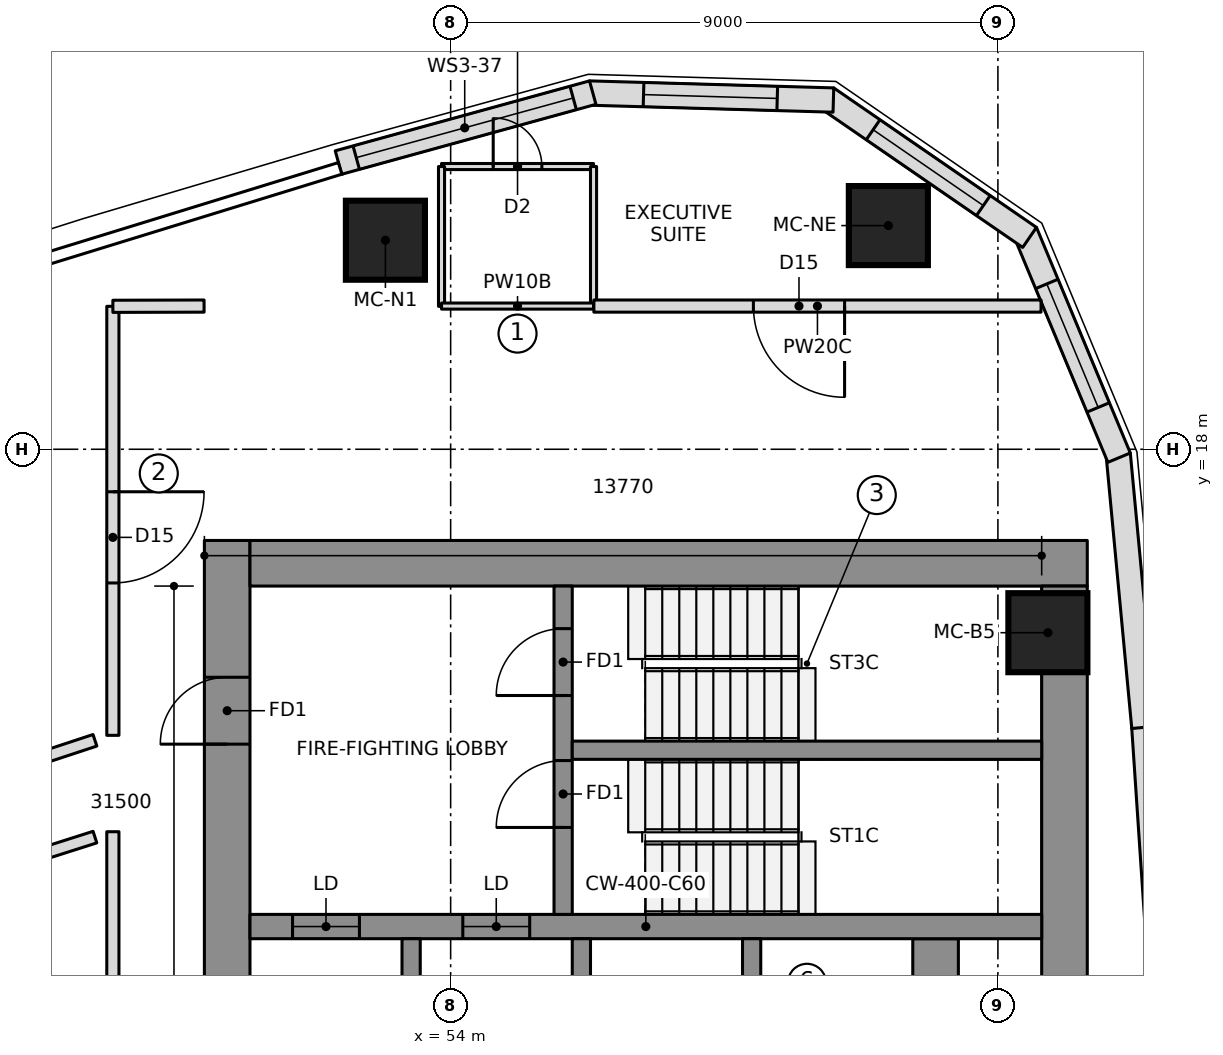
"""IFC4 building model, lengths in metres.
Left out: names, types, materials, properties, quantities, classifications, styles, units other than length and angle.
Written with IfcOpenShell. Run it as: python <this file> out.ifc"""

import sys

from ifc_helpers import new_model, si_unit, direction, frame, frame_2d, origin, origin_2d, place, context, subcontext, project, spatial, polyline, rectangle, outline, extrude, element, fill, save


model = new_model("IFC4")
c1 = context("Model", 3, precision=1e-05, world=origin(), true_north=direction((0.0, 1.0)))
c2 = subcontext(c1, "Body", "Model", "MODEL_VIEW")
j1 = project(units=[si_unit("LENGTHUNIT", "METRE"), si_unit("PLANEANGLEUNIT", "RADIAN")], contexts=[c1])
p1 = place(None, origin())
s1 = spatial("IfcSite", under=j1, at=p1, CompositionType="ELEMENT")
p2 = place(p1, origin())
s2 = spatial("IfcBuilding", under=s1, at=p2, CompositionType="ELEMENT")
p3 = place(p2, frame((0.0, 0.0, 189.7)))
s3 = spatial("IfcBuildingStorey", under=s2, at=p3, CompositionType="ELEMENT", Elevation=189.7)
p4 = place(p3, frame((50.325, 6.65, 0.0), z_axis=(0.0, 0.0, 1.0), x_axis=(0.0, 1.0, 0.0)))
e1 = element("IfcWall", 1, at=p4, inside=s3, PredefinedType="SHEAR", context=c2, shape_type="SweptSolid", body=[
    extrude(rectangle(XDim=9.85, YDim=0.75, at=frame_2d((4.925, 0.0))), origin(), (0.0, 0.0, 1.0), 3.55),
])
p5 = place(p4, frame((6.5, 0.0, 0.0)))
e2 = element("IfcOpeningElement", 2, at=p5, cuts=e1, PredefinedType="OPENING", context=c2, shape_type="SweptSolid", body=[
    extrude(rectangle(XDim=1.1, YDim=2.1, at=frame_2d((0.55, 1.05))), frame((0.0, 0.385, 0.0), z_axis=(0.0, -1.0, 0.0), x_axis=(1.0, 0.0, 0.0)), (0.0, 0.0, 1.0), 0.77),
])
p6 = place(p3, frame((50.7, 16.125, 0.0), z_axis=(0.0, 0.0, 1.0), x_axis=(1.0, 0.0, 0.0)))
e3 = element("IfcWall", 3, at=p6, inside=s3, PredefinedType="SHEAR", context=c2, shape_type="SweptSolid", body=[
    extrude(rectangle(XDim=13.77, YDim=0.75, at=frame_2d((6.885, 0.0))), origin(), (0.0, 0.0, 1.0), 3.55),
])
p7 = place(p3, frame((64.095, 8.099, 0.0), z_axis=(0.0, 0.0, 1.0), x_axis=(0.0, 1.0, 0.0)))
e4 = element("IfcWall", 4, at=p7, inside=s3, PredefinedType="SHEAR", context=c2, shape_type="SweptSolid", body=[
    extrude(rectangle(XDim=7.651, YDim=0.75, at=frame_2d((3.825, 0.0))), origin(), (0.0, 0.0, 1.0), 3.55),
])
p8 = place(p3, frame((61.975, -9.95, 0.0), z_axis=(0.0, 0.0, 1.0), x_axis=(0.0, 1.0, 0.0)))
e5 = element("IfcWall", 5, at=p8, inside=s3, PredefinedType="SHEAR", context=c2, shape_type="SweptSolid", body=[
    extrude(rectangle(XDim=19.9, YDim=0.75, at=frame_2d((9.95, 0.0))), origin(), (0.0, 0.0, 1.0), 3.55),
])
p9 = place(p3, frame((50.7, 10.15, 0.0), z_axis=(0.0, 0.0, 1.0), x_axis=(1.0, 0.0, 0.0)))
e6 = element("IfcWall", 6, at=p9, inside=s3, PredefinedType="SHEAR", context=c2, shape_type="SweptSolid", body=[
    extrude(rectangle(XDim=13.02, YDim=0.4, at=frame_2d((6.51, 0.0))), origin(), (0.0, 0.0, 1.0), 3.55),
])
p10 = place(p9, frame((0.7, 0.0, 0.0)))
e7 = element("IfcOpeningElement", 7, at=p10, cuts=e6, PredefinedType="OPENING", context=c2, shape_type="SweptSolid", body=[
    extrude(rectangle(XDim=1.1, YDim=2.1, at=frame_2d((0.55, 1.05))), frame((0.0, 0.21, 0.0), z_axis=(0.0, -1.0, 0.0), x_axis=(1.0, 0.0, 0.0)), (0.0, 0.0, 1.0), 0.42),
])
p11 = place(p9, frame((3.5, 0.0, 0.0)))
e8 = element("IfcOpeningElement", 8, at=p11, cuts=e6, PredefinedType="OPENING", context=c2, shape_type="SweptSolid", body=[
    extrude(rectangle(XDim=1.1, YDim=2.1, at=frame_2d((0.55, 1.05))), frame((0.0, 0.21, 0.0), z_axis=(0.0, -1.0, 0.0), x_axis=(1.0, 0.0, 0.0)), (0.0, 0.0, 1.0), 0.42),
])
for number, where, z_axis, x_axis in (
    (9, (53.35, 6.95, 0.0), (0.0, 0.0, 1.0), (0.0, 1.0, 0.0)),
    (10, (56.15, 6.95, 0.0), (0.0, 0.0, 1.0), (0.0, 1.0, 0.0)),
    (11, (58.95, 6.95, 0.0), (0.0, 0.0, 1.0), (0.0, 1.0, 0.0)),
):
    element("IfcWall", number, at=place(p3, frame(where, z_axis=z_axis, x_axis=x_axis)), inside=s3, PredefinedType="SHEAR", context=c2, shape_type="SweptSolid", body=[
        extrude(rectangle(XDim=3.0, YDim=0.3, at=frame_2d((1.5, 0.0))), origin(), (0.0, 0.0, 1.0), 3.55),
    ])
p12 = place(p3, frame((55.85, 10.35, 0.0), z_axis=(0.0, 0.0, 1.0), x_axis=(0.0, 1.0, 0.0)))
e12 = element("IfcWall", 12, at=p12, inside=s3, PredefinedType="SHEAR", context=c2, shape_type="SweptSolid", body=[
    extrude(rectangle(XDim=5.4, YDim=0.3, at=frame_2d((2.7, 0.0))), origin(), (0.0, 0.0, 1.0), 3.55),
])
p13 = place(p12, frame((1.43, 0.0, 0.0)))
e13 = element("IfcOpeningElement", 13, at=p13, cuts=e12, PredefinedType="OPENING", context=c2, shape_type="SweptSolid", body=[
    extrude(rectangle(XDim=1.1, YDim=2.1, at=frame_2d((0.55, 1.05))), frame((0.0, 0.16, 0.0), z_axis=(0.0, -1.0, 0.0), x_axis=(1.0, 0.0, 0.0)), (0.0, 0.0, 1.0), 0.32),
])
p14 = place(p12, frame((3.6, 0.0, 0.0)))
e14 = element("IfcOpeningElement", 14, at=p14, cuts=e12, PredefinedType="OPENING", context=c2, shape_type="SweptSolid", body=[
    extrude(rectangle(XDim=1.1, YDim=2.1, at=frame_2d((0.55, 1.05))), frame((0.0, 0.16, 0.0), z_axis=(0.0, -1.0, 0.0), x_axis=(1.0, 0.0, 0.0)), (0.0, 0.0, 1.0), 0.32),
])
p15 = place(p3, frame((56.0, 13.05, 0.0), z_axis=(0.0, 0.0, 1.0), x_axis=(1.0, 0.0, 0.0)))
e15 = element("IfcWall", 15, at=p15, inside=s3, PredefinedType="SHEAR", context=c2, shape_type="SweptSolid", body=[
    extrude(rectangle(XDim=7.72, YDim=0.3, at=frame_2d((3.86, 0.0))), origin(), (0.0, 0.0, 1.0), 3.55),
])
for number, where, z_axis, x_axis in (
    (16, (63.822, 14.983, 0.0), (0.0, 0.0, 1.0), (1.0, 0.0, 0.0)),
    (17, (61.198, 21.679, 0.0), (0.0, 0.0, 1.0), (1.0, 0.0, 0.0)),
    (18, (52.927, 21.438, 0.0), (0.0, 0.0, 1.0), (1.0, 0.0, 0.0)),
):
    element("IfcColumn", number, at=place(p3, frame(where, z_axis=z_axis, x_axis=x_axis)), inside=s3, PredefinedType="COLUMN", context=c2, shape_type="SweptSolid", body=[
        extrude(rectangle(XDim=1.3, YDim=1.3, at=origin_2d()), origin(), (0.0, 0.0, 1.0), 3.55),
    ])
p16 = place(p3, frame((65.7, 8.958, 0.0), z_axis=(0.0, 0.0, 1.0), x_axis=(-0.066905935948, 0.997759287471, 0.0)))
e19 = element("IfcWall", 19, at=p16, inside=s3, PredefinedType="NOTDEFINED", context=c2, shape_type="SweptSolid", body=[
    extrude(outline(polyline([(-0.003, -0.2), (4.484, -0.2), (4.478, 0.2), (0.003, 0.2), (-0.003, -0.2)])), origin(), (0.0, 0.0, 1.0), 3.25),
])
p17 = place(p3, frame((65.401, 13.429, 0.0), z_axis=(0.0, 0.0, 1.0), x_axis=(-0.093605694738, 0.995609348044, 0.0)))
e20 = element("IfcWall", 20, at=p17, inside=s3, PredefinedType="NOTDEFINED", context=c2, shape_type="SweptSolid", body=[
    extrude(outline(polyline([(-0.003, -0.2), (4.511, -0.2), (4.451, 0.2), (0.003, 0.2), (-0.003, -0.2)])), origin(), (0.0, 0.0, 1.0), 3.25),
])
p18 = place(p3, frame((64.981, 17.89, 0.0), z_axis=(0.0, 0.0, 1.0), x_axis=(-0.383997619794, 0.923334082547, 0.0)))
e21 = element("IfcWall", 21, at=p18, inside=s3, PredefinedType="NOTDEFINED", context=c2, shape_type="SweptSolid", body=[
    extrude(outline(polyline([(-0.03, -0.2), (3.988, -0.2), (3.87, 0.2), (0.03, 0.2), (-0.03, -0.2)])), origin(), (0.0, 0.0, 1.0), 3.25),
])
p19 = place(p18, frame((0.865, 0.0, 0.6)))
e22 = element("IfcOpeningElement", 22, at=p19, cuts=e21, PredefinedType="OPENING", context=c2, shape_type="SweptSolid", body=[
    extrude(outline(polyline([(0.0, 1.35), (0.084, 1.771), (0.322, 2.128), (0.679, 2.366), (1.1, 2.45), (1.521, 2.366), (1.878, 2.128), (2.116, 1.771), (2.2, 1.35), (2.2, 1.1), (2.116, 0.679), (1.878, 0.322), (1.521, 0.084), (1.1, 0.0), (0.679, 0.084), (0.322, 0.322), (0.084, 0.679), (0.0, 1.1), (0.0, 1.35)])), frame((0.0, 0.21, 0.0), z_axis=(0.0, -1.0, 0.0), x_axis=(1.0, 0.0, 0.0)), (0.0, 0.0, 1.0), 0.42),
])
p20 = place(p3, frame((63.472, 21.518, 0.0), z_axis=(0.0, 0.0, 1.0), x_axis=(-0.823806162588, 0.566871596115, 0.0)))
e23 = element("IfcWall", 23, at=p20, inside=s3, PredefinedType="NOTDEFINED", context=c2, shape_type="SweptSolid", body=[
    extrude(outline(polyline([(-0.059, -0.2), (3.988, -0.2), (3.87, 0.2), (0.059, 0.2), (-0.059, -0.2)])), origin(), (0.0, 0.0, 1.0), 3.25),
])
p21 = place(p20, frame((0.865, 0.0, 0.6)))
e24 = element("IfcOpeningElement", 24, at=p21, cuts=e23, PredefinedType="OPENING", context=c2, shape_type="SweptSolid", body=[
    extrude(outline(polyline([(0.0, 1.35), (0.084, 1.771), (0.322, 2.128), (0.679, 2.366), (1.1, 2.45), (1.521, 2.366), (1.878, 2.128), (2.116, 1.771), (2.2, 1.35), (2.2, 1.1), (2.116, 0.679), (1.878, 0.322), (1.521, 0.084), (1.1, 0.0), (0.679, 0.084), (0.322, 0.322), (0.084, 0.679), (0.0, 1.1), (0.0, 1.35)])), frame((0.0, 0.21, 0.0), z_axis=(0.0, -1.0, 0.0), x_axis=(1.0, 0.0, 0.0)), (0.0, 0.0, 1.0), 0.42),
])
p22 = place(p3, frame((60.236, 23.745, 0.0), z_axis=(0.0, 0.0, 1.0), x_axis=(-0.999587920197, 0.028705222472, 0.0)))
e25 = element("IfcWall", 25, at=p22, inside=s3, PredefinedType="NOTDEFINED", context=c2, shape_type="SweptSolid", body=[
    extrude(outline(polyline([(-0.059, -0.2), (3.959, -0.2), (3.9, 0.2), (0.059, 0.2), (-0.059, -0.2)])), origin(), (0.0, 0.0, 1.0), 3.25),
])
p23 = place(p22, frame((0.865, 0.0, 0.6)))
e26 = element("IfcOpeningElement", 26, at=p23, cuts=e25, PredefinedType="OPENING", context=c2, shape_type="SweptSolid", body=[
    extrude(outline(polyline([(0.0, 1.35), (0.084, 1.771), (0.322, 2.128), (0.679, 2.366), (1.1, 2.45), (1.521, 2.366), (1.878, 2.128), (2.116, 1.771), (2.2, 1.35), (2.2, 1.1), (2.116, 0.679), (1.878, 0.322), (1.521, 0.084), (1.1, 0.0), (0.679, 0.084), (0.322, 0.322), (0.084, 0.679), (0.0, 1.1), (0.0, 1.35)])), frame((0.0, 0.21, 0.0), z_axis=(0.0, -1.0, 0.0), x_axis=(1.0, 0.0, 0.0)), (0.0, 0.0, 1.0), 0.42),
])
p24 = place(p3, frame((56.308, 23.858, 0.0), z_axis=(0.0, 0.0, 1.0), x_axis=(-0.964205755089, -0.265155165617, 0.0)))
e27 = element("IfcWall", 27, at=p24, inside=s3, PredefinedType="NOTDEFINED", context=c2, shape_type="SweptSolid", body=[
    extrude(outline(polyline([(-0.03, -0.2), (4.307, -0.2), (4.307, 0.2), (0.03, 0.2), (-0.03, -0.2)])), origin(), (0.0, 0.0, 1.0), 3.25),
])
p25 = place(p24, frame((0.303, 0.0, 0.9)))
e28 = element("IfcOpeningElement", 28, at=p25, cuts=e27, PredefinedType="OPENING", context=c2, shape_type="SweptSolid", body=[
    extrude(rectangle(XDim=3.7, YDim=1.8, at=frame_2d((1.85, 0.9))), frame((0.0, 0.21, 0.0), z_axis=(0.0, -1.0, 0.0), x_axis=(1.0, 0.0, 0.0)), (0.0, 0.0, 1.0), 0.42),
])
p26 = place(p3, frame((53.85, 22.65, 0.0), z_axis=(0.0, 0.0, 1.0), x_axis=(1.0, 0.0, 0.0)))
e29 = element("IfcWall", 29, at=p26, inside=s3, PredefinedType="PARTITIONING", context=c2, shape_type="SweptSolid", body=[
    extrude(rectangle(XDim=2.5, YDim=0.1, at=frame_2d((1.25, 0.0))), origin(), (0.0, 0.0, 1.0), 3.25),
])
p27 = place(p26, frame((0.85, 0.0, 0.0)))
e30 = element("IfcOpeningElement", 30, at=p27, cuts=e29, PredefinedType="OPENING", context=c2, shape_type="SweptSolid", body=[
    extrude(rectangle(XDim=0.8, YDim=2.1, at=frame_2d((0.4, 1.05))), frame((0.0, 0.06, 0.0), z_axis=(0.0, -1.0, 0.0), x_axis=(1.0, 0.0, 0.0)), (0.0, 0.0, 1.0), 0.12),
])
for number, where, z_axis, x_axis in (
    (31, (56.35, 22.65, 0.0), (0.0, 0.0, 1.0), (0.0, -1.0, 0.0)),
    (32, (53.85, 20.35, 0.0), (0.0, 0.0, 1.0), (0.0, 1.0, 0.0)),
):
    element("IfcWall", number, at=place(p3, frame(where, z_axis=z_axis, x_axis=x_axis)), inside=s3, PredefinedType="PARTITIONING", context=c2, shape_type="SweptSolid", body=[
        extrude(rectangle(XDim=2.3, YDim=0.1, at=frame_2d((1.15, 0.0))), origin(), (0.0, 0.0, 1.0), 3.25),
    ])
p28 = place(p3, frame((63.709, 20.355, 0.0), z_axis=(0.0, 0.0, 1.0), x_axis=(-1.0, 0.0, 0.0)))
e33 = element("IfcWall", 33, at=p28, inside=s3, PredefinedType="PARTITIONING", context=c2, shape_type="SweptSolid", body=[
    extrude(rectangle(XDim=7.354, YDim=0.2, at=frame_2d((3.677, 0.0))), origin(), (0.0, 0.0, 1.0), 3.25),
])
p29 = place(p28, frame((3.231, 0.0, 0.0)))
e34 = element("IfcOpeningElement", 34, at=p29, cuts=e33, PredefinedType="OPENING", context=c2, shape_type="SweptSolid", body=[
    extrude(rectangle(XDim=1.5, YDim=2.1, at=frame_2d((0.75, 1.05))), frame((0.0, 0.11, 0.0), z_axis=(0.0, -1.0, 0.0), x_axis=(1.0, 0.0, 0.0)), (0.0, 0.0, 1.0), 0.22),
])
p30 = place(p3, frame((56.35, 20.355, 0.0), z_axis=(0.0, 0.0, 1.0), x_axis=(-1.0, 0.0, 0.0)))
e35 = element("IfcWall", 35, at=p30, inside=s3, PredefinedType="PARTITIONING", context=c2, shape_type="SweptSolid", body=[
    extrude(rectangle(XDim=2.5, YDim=0.1, at=frame_2d((1.25, 0.0))), origin(), (0.0, 0.0, 1.0), 3.25),
])
p31 = place(p3, frame((48.15, 13.213, 0.0), z_axis=(0.0, 0.0, 1.0), x_axis=(-0.949729856115, -0.313070599711, 0.0)))
e36 = element("IfcWall", 36, at=p31, inside=s3, PredefinedType="PARTITIONING", context=c2, shape_type="SweptSolid", body=[
    extrude(rectangle(XDim=3.853, YDim=0.2, at=frame_2d((1.927, 0.0))), origin(), (0.0, 0.0, 1.0), 3.25),
])
p32 = place(p3, frame((46.881, 11.217, 0.0), z_axis=(0.0, 0.0, 1.0), x_axis=(0.952761948983, 0.303718074157, 0.0)))
e37 = element("IfcWall", 37, at=p32, inside=s3, PredefinedType="PARTITIONING", context=c2, shape_type="SweptSolid", body=[
    extrude(rectangle(XDim=1.332, YDim=0.2, at=frame_2d((0.666, 0.0))), origin(), (0.0, 0.0, 1.0), 3.25),
])
p33 = place(p3, frame((48.445, 11.71, 0.0), z_axis=(0.0, 0.0, 1.0), x_axis=(0.0, -1.0, 0.0)))
e38 = element("IfcWall", 38, at=p33, inside=s3, PredefinedType="PARTITIONING", context=c2, shape_type="SweptSolid", body=[
    extrude(rectangle(XDim=23.42, YDim=0.2, at=frame_2d((11.71, 0.0))), origin(), (0.0, 0.0, 1.0), 3.25),
])
p34 = place(p3, frame((48.445, 20.351, 0.0), z_axis=(0.0, 0.0, 1.0), x_axis=(0.0, -1.0, 0.0)))
e39 = element("IfcWall", 39, at=p34, inside=s3, PredefinedType="PARTITIONING", context=c2, shape_type="SweptSolid", body=[
    extrude(rectangle(XDim=7.056, YDim=0.2, at=frame_2d((3.528, 0.0))), origin(), (0.0, 0.0, 1.0), 3.25),
])
p35 = place(p34, frame((3.05, 0.0, 0.0)))
e40 = element("IfcOpeningElement", 40, at=p35, cuts=e39, PredefinedType="OPENING", context=c2, shape_type="SweptSolid", body=[
    extrude(rectangle(XDim=1.5, YDim=2.1, at=frame_2d((0.75, 1.05))), frame((0.0, 0.11, 0.0), z_axis=(0.0, -1.0, 0.0), x_axis=(1.0, 0.0, 0.0)), (0.0, 0.0, 1.0), 0.22),
])
p36 = place(p3, frame((49.945, 20.355, 0.0), z_axis=(0.0, 0.0, 1.0), x_axis=(-0.999996609175, -0.002604157836, 0.0)))
e41 = element("IfcWall", 41, at=p36, inside=s3, PredefinedType="PARTITIONING", context=c2, shape_type="SweptSolid", body=[
    extrude(rectangle(XDim=1.5, YDim=0.2, at=frame_2d((0.75, 0.0))), origin(), (0.0, 0.0, 1.0), 3.25),
])
p37 = place(p19, origin())
e42 = element("IfcWindow", 42, at=p37, inside=s3, PartitioningType="SINGLE_PANEL", PredefinedType="WINDOW", context=c2, shape_type="SweptSolid", body=[
    extrude(outline(polyline([(0.0, 1.35), (0.084, 1.771), (0.322, 2.128), (0.679, 2.366), (1.1, 2.45), (1.521, 2.366), (1.878, 2.128), (2.116, 1.771), (2.2, 1.35), (2.2, 1.1), (2.116, 0.679), (1.878, 0.322), (1.521, 0.084), (1.1, 0.0), (0.679, 0.084), (0.322, 0.322), (0.084, 0.679), (0.0, 1.1), (0.0, 1.35)])), frame((0.0, 0.17, 0.0), z_axis=(0.0, -1.0, 0.0), x_axis=(1.0, 0.0, 0.0)), (0.0, 0.0, 1.0), 0.06),
])
fill(e22, e42)
p38 = place(p21, origin())
e43 = element("IfcWindow", 43, at=p38, inside=s3, PartitioningType="SINGLE_PANEL", PredefinedType="WINDOW", context=c2, shape_type="SweptSolid", body=[
    extrude(outline(polyline([(0.0, 1.35), (0.084, 1.771), (0.322, 2.128), (0.679, 2.366), (1.1, 2.45), (1.521, 2.366), (1.878, 2.128), (2.116, 1.771), (2.2, 1.35), (2.2, 1.1), (2.116, 0.679), (1.878, 0.322), (1.521, 0.084), (1.1, 0.0), (0.679, 0.084), (0.322, 0.322), (0.084, 0.679), (0.0, 1.1), (0.0, 1.35)])), frame((0.0, 0.17, 0.0), z_axis=(0.0, -1.0, 0.0), x_axis=(1.0, 0.0, 0.0)), (0.0, 0.0, 1.0), 0.06),
])
fill(e24, e43)
p39 = place(p23, origin())
e44 = element("IfcWindow", 44, at=p39, inside=s3, PartitioningType="SINGLE_PANEL", PredefinedType="WINDOW", context=c2, shape_type="SweptSolid", body=[
    extrude(outline(polyline([(0.0, 1.35), (0.084, 1.771), (0.322, 2.128), (0.679, 2.366), (1.1, 2.45), (1.521, 2.366), (1.878, 2.128), (2.116, 1.771), (2.2, 1.35), (2.2, 1.1), (2.116, 0.679), (1.878, 0.322), (1.521, 0.084), (1.1, 0.0), (0.679, 0.084), (0.322, 0.322), (0.084, 0.679), (0.0, 1.1), (0.0, 1.35)])), frame((0.0, 0.17, 0.0), z_axis=(0.0, -1.0, 0.0), x_axis=(1.0, 0.0, 0.0)), (0.0, 0.0, 1.0), 0.06),
])
fill(e26, e44)
p40 = place(p25, origin())
e45 = element("IfcWindow", 45, at=p40, inside=s3, PartitioningType="SINGLE_PANEL", PredefinedType="WINDOW", context=c2, shape_type="SweptSolid", body=[
    extrude(rectangle(XDim=3.7, YDim=1.8, at=frame_2d((1.85, 0.9))), frame((0.0, 0.17, 0.0), z_axis=(0.0, -1.0, 0.0), x_axis=(1.0, 0.0, 0.0)), (0.0, 0.0, 1.0), 0.06),
])
fill(e28, e45)
p41 = place(p27, origin())
e46 = element("IfcDoor", 46, at=p41, inside=s3, OperationType="SINGLE_SWING_LEFT", PredefinedType="DOOR", context=c2, shape_type="SweptSolid", body=[
    extrude(rectangle(XDim=0.8, YDim=2.1, at=frame_2d((0.4, 1.05))), frame((0.0, 0.025, 0.0), z_axis=(0.0, -1.0, 0.0), x_axis=(1.0, 0.0, 0.0)), (0.0, 0.0, 1.0), 0.05),
])
fill(e30, e46)
p42 = place(p29, origin())
e47 = element("IfcDoor", 47, at=p42, inside=s3, OperationType="DOUBLE_DOOR_SINGLE_SWING", PredefinedType="DOOR", context=c2, shape_type="SweptSolid", body=[
    extrude(rectangle(XDim=1.5, YDim=2.1, at=frame_2d((0.75, 1.05))), frame((0.0, 0.025, 0.0), z_axis=(0.0, -1.0, 0.0), x_axis=(1.0, 0.0, 0.0)), (0.0, 0.0, 1.0), 0.05),
])
fill(e34, e47)
p43 = place(p35, origin())
e48 = element("IfcDoor", 48, at=p43, inside=s3, OperationType="DOUBLE_DOOR_SINGLE_SWING", PredefinedType="DOOR", context=c2, shape_type="SweptSolid", body=[
    extrude(rectangle(XDim=1.5, YDim=2.1, at=frame_2d((0.75, 1.05))), frame((0.0, 0.025, 0.0), z_axis=(0.0, -1.0, 0.0), x_axis=(1.0, 0.0, 0.0)), (0.0, 0.0, 1.0), 0.05),
])
fill(e40, e48)
p44 = place(p10, origin())
e49 = element("IfcDoor", 49, at=p44, inside=s3, OperationType="DOUBLE_DOOR_SLIDING", PredefinedType="DOOR", context=c2, shape_type="SweptSolid", body=[
    extrude(rectangle(XDim=1.1, YDim=2.1, at=frame_2d((0.55, 1.05))), frame((0.0, 0.025, 0.0), z_axis=(0.0, -1.0, 0.0), x_axis=(1.0, 0.0, 0.0)), (0.0, 0.0, 1.0), 0.05),
])
fill(e7, e49)
p45 = place(p11, origin())
e50 = element("IfcDoor", 50, at=p45, inside=s3, OperationType="DOUBLE_DOOR_SLIDING", PredefinedType="DOOR", context=c2, shape_type="SweptSolid", body=[
    extrude(rectangle(XDim=1.1, YDim=2.1, at=frame_2d((0.55, 1.05))), frame((0.0, 0.025, 0.0), z_axis=(0.0, -1.0, 0.0), x_axis=(1.0, 0.0, 0.0)), (0.0, 0.0, 1.0), 0.05),
])
fill(e8, e50)
p46 = place(p13, origin())
e51 = element("IfcDoor", 51, at=p46, inside=s3, OperationType="SINGLE_SWING_RIGHT", PredefinedType="DOOR", context=c2, shape_type="SweptSolid", body=[
    extrude(rectangle(XDim=1.1, YDim=2.1, at=frame_2d((0.55, 1.05))), frame((0.0, 0.025, 0.0), z_axis=(0.0, -1.0, 0.0), x_axis=(1.0, 0.0, 0.0)), (0.0, 0.0, 1.0), 0.05),
])
fill(e13, e51)
p47 = place(p14, origin())
e52 = element("IfcDoor", 52, at=p47, inside=s3, OperationType="SINGLE_SWING_RIGHT", PredefinedType="DOOR", context=c2, shape_type="SweptSolid", body=[
    extrude(rectangle(XDim=1.1, YDim=2.1, at=frame_2d((0.55, 1.05))), frame((0.0, 0.025, 0.0), z_axis=(0.0, -1.0, 0.0), x_axis=(1.0, 0.0, 0.0)), (0.0, 0.0, 1.0), 0.05),
])
fill(e14, e52)
p48 = place(p5, origin())
e53 = element("IfcDoor", 53, at=p48, inside=s3, OperationType="SINGLE_SWING_RIGHT", PredefinedType="DOOR", context=c2, shape_type="SweptSolid", body=[
    extrude(rectangle(XDim=1.1, YDim=2.1, at=frame_2d((0.55, 1.05))), frame((0.0, 0.025, 0.0), z_axis=(0.0, -1.0, 0.0), x_axis=(1.0, 0.0, 0.0)), (0.0, 0.0, 1.0), 0.05),
])
fill(e2, e53)
save(model, sys.argv[1])
